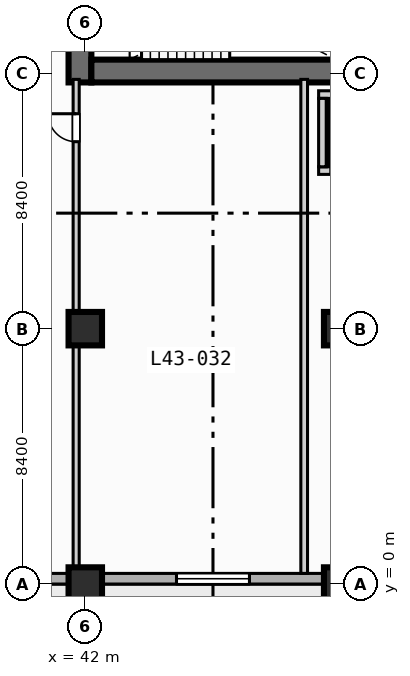
"""IFC4 building model, lengths in metres.
Left out: names, types, materials, properties, quantities, classifications, styles, units other than length and angle.
Written with IfcOpenShell. Run it as: python <this file> out.ifc"""

import sys

from ifc_helpers import new_model, si_unit, direction, frame, frame_2d, origin, origin_2d, place, context, subcontext, project, spatial, rectangle, extrude, element, fill, save


model = new_model("IFC4")
c1 = context("Model", 3, precision=1e-05, world=origin(), true_north=direction((0.0, 1.0)))
c2 = subcontext(c1, "Body", "Model", "MODEL_VIEW")
j1 = project(units=[si_unit("LENGTHUNIT", "METRE"), si_unit("PLANEANGLEUNIT", "RADIAN")], contexts=[c1])
p1 = place(None, origin())
s1 = spatial("IfcSite", under=j1, at=p1, CompositionType="ELEMENT")
p2 = place(p1, origin())
s2 = spatial("IfcBuilding", under=s1, at=p2, CompositionType="ELEMENT")
p3 = place(p2, frame((0.0, 0.0, 179.1)))
s3 = spatial("IfcBuildingStorey", under=s2, at=p3, CompositionType="ELEMENT", Elevation=179.1)
p4 = place(p3, frame((41.825, 16.5, 0.0), z_axis=(0.0, 0.0, 1.0), x_axis=(0.0, 1.0, 0.0)))
e1 = element("IfcWall", 1, at=p4, inside=s3, PredefinedType="SHEAR", context=c2, shape_type="SweptSolid", body=[
    extrude(rectangle(XDim=1.5, YDim=0.75, at=frame_2d((0.75, 0.0))), origin(), (0.0, 0.0, 1.0), 3.47),
])
p5 = place(p3, frame((42.2, 16.875, 0.0), z_axis=(0.0, 0.0, 1.0), x_axis=(1.0, 0.0, 0.0)))
e2 = element("IfcWall", 2, at=p5, inside=s3, PredefinedType="SHEAR", context=c2, shape_type="SweptSolid", body=[
    extrude(rectangle(XDim=16.35, YDim=0.75, at=frame_2d((8.175, 0.0))), origin(), (0.0, 0.0, 1.0), 3.47),
])
for number, where, z_axis, x_axis in (
    (3, (42.0, 0.0, 0.0), (0.0, 0.0, 1.0), (1.0, 0.0, 0.0)),
    (4, (42.0, 8.4, 0.0), (0.0, 0.0, 1.0), (1.0, 0.0, 0.0)),
    (5, (50.4, 0.0, 0.0), (0.0, 0.0, 1.0), (1.0, 0.0, 0.0)),
    (6, (50.4, 8.4, 0.0), (0.0, 0.0, 1.0), (1.0, 0.0, 0.0)),
):
    element("IfcColumn", number, at=place(p3, frame(where, z_axis=z_axis, x_axis=x_axis)), inside=s3, PredefinedType="COLUMN", context=c2, shape_type="SweptSolid", body=[
        extrude(rectangle(XDim=1.1, YDim=1.1, at=origin_2d()), origin(), (0.0, 0.0, 1.0), 3.7),
    ])
p6 = place(p3, frame((72.425, 0.175, 0.0), z_axis=(0.0, 0.0, 1.0), x_axis=(-1.0, 0.0, 0.0)))
e7 = element("IfcWall", 7, at=p6, inside=s3, PredefinedType="STANDARD", context=c2, shape_type="SweptSolid", body=[
    extrude(rectangle(XDim=69.25, YDim=0.35, at=frame_2d((34.625, 0.0))), origin(), (0.0, 0.0, 1.0), 3.47),
])
p7 = place(p6, frame((50.725, 0.0, 0.0)))
e8 = element("IfcOpeningElement", 8, at=p7, cuts=e7, PredefinedType="OPENING", context=c2, shape_type="SweptSolid", body=[
    extrude(rectangle(XDim=1.4, YDim=2.2, at=frame_2d((0.7, 1.1))), frame((0.0, 0.185, 0.0), z_axis=(0.0, -1.0, 0.0), x_axis=(1.0, 0.0, 0.0)), (0.0, 0.0, 1.0), 0.37),
])
p8 = place(p6, frame((58.625, 0.0, 0.85)))
e9 = element("IfcOpeningElement", 9, at=p8, cuts=e7, PredefinedType="OPENING", context=c2, shape_type="SweptSolid", body=[
    extrude(rectangle(XDim=2.4, YDim=1.95, at=frame_2d((1.2, 0.975))), frame((0.0, 0.185, 0.0), z_axis=(0.0, -1.0, 0.0), x_axis=(1.0, 0.0, 0.0)), (0.0, 0.0, 1.0), 0.37),
])
p9 = place(p6, frame((41.825, 0.0, 0.85)))
e10 = element("IfcOpeningElement", 10, at=p9, cuts=e7, PredefinedType="OPENING", context=c2, shape_type="SweptSolid", body=[
    extrude(rectangle(XDim=2.4, YDim=1.95, at=frame_2d((1.2, 0.975))), frame((0.0, 0.185, 0.0), z_axis=(0.0, -1.0, 0.0), x_axis=(1.0, 0.0, 0.0)), (0.0, 0.0, 1.0), 0.37),
])
p10 = place(p6, frame((33.725, 0.0, 0.85)))
e11 = element("IfcOpeningElement", 11, at=p10, cuts=e7, PredefinedType="OPENING", context=c2, shape_type="SweptSolid", body=[
    extrude(rectangle(XDim=1.8, YDim=1.8, at=frame_2d((0.9, 0.9))), frame((0.0, 0.185, 0.0), z_axis=(0.0, -1.0, 0.0), x_axis=(1.0, 0.0, 0.0)), (0.0, 0.0, 1.0), 0.37),
])
p11 = place(p6, frame((25.025, 0.0, 0.85)))
e12 = element("IfcOpeningElement", 12, at=p11, cuts=e7, PredefinedType="OPENING", context=c2, shape_type="SweptSolid", body=[
    extrude(rectangle(XDim=2.4, YDim=1.95, at=frame_2d((1.2, 0.975))), frame((0.0, 0.185, 0.0), z_axis=(0.0, -1.0, 0.0), x_axis=(1.0, 0.0, 0.0)), (0.0, 0.0, 1.0), 0.37),
])
p12 = place(p6, frame((67.075, 0.0, 0.85)))
e13 = element("IfcOpeningElement", 13, at=p12, cuts=e7, PredefinedType="OPENING", context=c2, shape_type="SweptSolid", body=[
    extrude(rectangle(XDim=1.8, YDim=1.8, at=frame_2d((0.9, 0.9))), frame((0.0, 0.185, 0.0), z_axis=(0.0, -1.0, 0.0), x_axis=(1.0, 0.0, 0.0)), (0.0, 0.0, 1.0), 0.37),
])
p13 = place(p6, frame((56.39, 0.0, 0.85)))
e14 = element("IfcOpeningElement", 14, at=p13, cuts=e7, PredefinedType="OPENING", context=c2, shape_type="SweptSolid", body=[
    extrude(rectangle(XDim=0.72, YDim=1.8, at=frame_2d((0.36, 0.9))), frame((0.0, 0.185, 0.0), z_axis=(0.0, -1.0, 0.0), x_axis=(1.0, 0.0, 0.0)), (0.0, 0.0, 1.0), 0.37),
])
p14 = place(p6, frame((9.075, 0.0, 0.85)))
e15 = element("IfcOpeningElement", 15, at=p14, cuts=e7, PredefinedType="OPENING", context=c2, shape_type="SweptSolid", body=[
    extrude(rectangle(XDim=1.8, YDim=1.8, at=frame_2d((0.9, 0.9))), frame((0.0, 0.185, 0.0), z_axis=(0.0, -1.0, 0.0), x_axis=(1.0, 0.0, 0.0)), (0.0, 0.0, 1.0), 0.37),
])
p15 = place(p6, frame((2.675, 0.0, 0.85)))
e16 = element("IfcOpeningElement", 16, at=p15, cuts=e7, PredefinedType="OPENING", context=c2, shape_type="SweptSolid", body=[
    extrude(rectangle(XDim=1.8, YDim=1.8, at=frame_2d((0.9, 0.9))), frame((0.0, 0.185, 0.0), z_axis=(0.0, -1.0, 0.0), x_axis=(1.0, 0.0, 0.0)), (0.0, 0.0, 1.0), 0.37),
])
p16 = place(p3, frame((49.675, 13.6, 0.0), z_axis=(0.0, 0.0, 1.0), x_axis=(1.0, 0.0, 0.0)))
e17 = element("IfcWall", 17, at=p16, inside=s3, PredefinedType="SOLIDWALL", context=c2, shape_type="SweptSolid", body=[
    extrude(rectangle(XDim=2.25, YDim=0.25, at=frame_2d((1.125, 0.0))), origin(), (0.0, 0.0, 1.0), 3.47),
])
p17 = place(p16, frame((0.4, 0.0, 0.0)))
e18 = element("IfcOpeningElement", 18, at=p17, cuts=e17, PredefinedType="OPENING", context=c2, shape_type="SweptSolid", body=[
    extrude(rectangle(XDim=1.1, YDim=2.15, at=frame_2d((0.55, 1.075))), frame((0.0, 0.135, 0.0), z_axis=(0.0, -1.0, 0.0), x_axis=(1.0, 0.0, 0.0)), (0.0, 0.0, 1.0), 0.27),
])
for number, where, z_axis, x_axis in (
    (19, (49.675, 16.1, 0.0), (0.0, 0.0, 1.0), (1.0, 0.0, 0.0)),
    (20, (49.8, 13.725, 0.0), (0.0, 0.0, 1.0), (0.0, 1.0, 0.0)),
):
    element("IfcWall", number, at=place(p3, frame(where, z_axis=z_axis, x_axis=x_axis)), inside=s3, PredefinedType="SOLIDWALL", context=c2, shape_type="SweptSolid", body=[
        extrude(rectangle(XDim=2.25, YDim=0.25, at=frame_2d((1.125, 0.0))), origin(), (0.0, 0.0, 1.0), 3.47),
    ])
p18 = place(p3, frame((41.7, 0.35, 0.0), z_axis=(0.0, 0.0, 1.0), x_axis=(0.0, 1.0, 0.0)))
e21 = element("IfcWall", 21, at=p18, inside=s3, PredefinedType="PARTITIONING", context=c2, shape_type="SweptSolid", body=[
    extrude(rectangle(XDim=16.25, YDim=0.2, at=frame_2d((8.125, 0.0))), origin(), (0.0, 0.0, 1.0), 2.82),
])
p19 = place(p18, frame((14.2, 0.0, 0.0)))
e22 = element("IfcOpeningElement", 22, at=p19, cuts=e21, PredefinedType="OPENING", context=c2, shape_type="SweptSolid", body=[
    extrude(rectangle(XDim=0.92, YDim=2.1, at=frame_2d((0.46, 1.05))), frame((0.0, 0.11, 0.0), z_axis=(0.0, -1.0, 0.0), x_axis=(1.0, 0.0, 0.0)), (0.0, 0.0, 1.0), 0.22),
])
p20 = place(p3, frame((49.2, 0.35, 0.0), z_axis=(0.0, 0.0, 1.0), x_axis=(0.0, 1.0, 0.0)))
e23 = element("IfcWall", 23, at=p20, inside=s3, PredefinedType="PARTITIONING", context=c2, shape_type="SweptSolid", body=[
    extrude(rectangle(XDim=16.25, YDim=0.22, at=frame_2d((8.125, 0.0))), origin(), (0.0, 0.0, 1.0), 3.47),
])
p21 = place(p11, origin())
e24 = element("IfcWindow", 24, at=p21, inside=s3, PartitioningType="SINGLE_PANEL", PredefinedType="WINDOW", context=c2, shape_type="SweptSolid", body=[
    extrude(rectangle(XDim=2.4, YDim=1.95, at=frame_2d((1.2, 0.975))), frame((0.0, 0.03, 0.0), z_axis=(0.0, -1.0, 0.0), x_axis=(1.0, 0.0, 0.0)), (0.0, 0.0, 1.0), 0.06),
])
fill(e12, e24)
p22 = place(p19, origin())
e25 = element("IfcDoor", 25, at=p22, inside=s3, OperationType="SINGLE_SWING_RIGHT", PredefinedType="DOOR", context=c2, shape_type="SweptSolid", body=[
    extrude(rectangle(XDim=0.92, YDim=2.1, at=frame_2d((0.46, 1.05))), frame((0.0, 0.025, 0.0), z_axis=(0.0, -1.0, 0.0), x_axis=(1.0, 0.0, 0.0)), (0.0, 0.0, 1.0), 0.05),
])
fill(e22, e25)
save(model, sys.argv[1])
